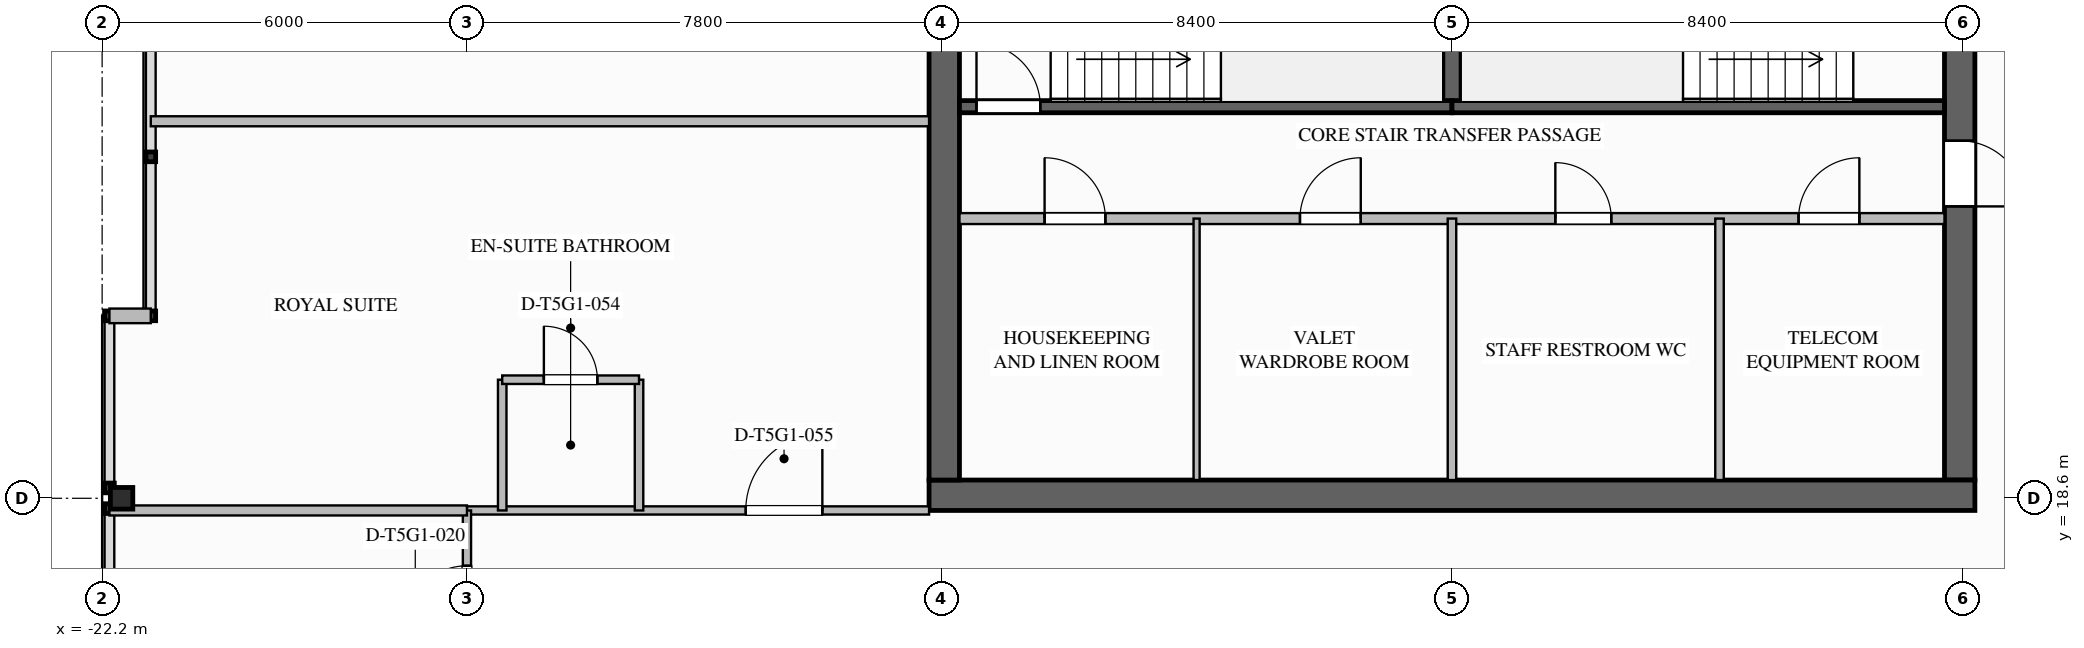
"""IFC4 building model, lengths in metres.
Left out: names, types, materials, properties, quantities, classifications, styles, units other than length and angle.
Written with IfcOpenShell. Run it as: python <this file> out.ifc"""

import sys

from ifc_helpers import new_model, si_unit, direction, frame, frame_2d, origin, origin_2d, place, context, subcontext, project, spatial, rectangle, i_section, extrude, element, fill, save


model = new_model("IFC4")
c1 = context("Model", 3, precision=1e-05, world=origin(), true_north=direction((0.0, 1.0)))
c2 = subcontext(c1, "Body", "Model", "MODEL_VIEW")
j1 = project(units=[si_unit("LENGTHUNIT", "METRE"), si_unit("PLANEANGLEUNIT", "RADIAN")], contexts=[c1])
p1 = place(None, origin())
s1 = spatial("IfcSite", under=j1, at=p1, CompositionType="ELEMENT")
p2 = place(p1, origin())
s2 = spatial("IfcBuilding", under=s1, at=p2, CompositionType="ELEMENT")
p3 = place(p2, frame((0.0, 0.0, 272.3)))
s3 = spatial("IfcBuildingStorey", under=s2, at=p3, CompositionType="ELEMENT", Elevation=272.3)
p4 = place(p3, frame((8.35, 35.1, 0.0), z_axis=(0.0, 0.0, 1.0), x_axis=(0.0, -1.0, 0.0)))
e1 = element("IfcWall", 1, at=p4, inside=s3, PredefinedType="SHEAR", context=c2, shape_type="SweptSolid", body=[
    extrude(rectangle(XDim=16.2, YDim=0.5, at=frame_2d((8.1, 0.0))), origin(), (0.0, 0.0, 1.0), 3.65),
])
p5 = place(p4, frame((3.08, 0.0, 0.0)))
e2 = element("IfcOpeningElement", 2, at=p5, cuts=e1, PredefinedType="OPENING", context=c2, shape_type="SweptSolid", body=[
    extrude(rectangle(XDim=1.12, YDim=2.1, at=frame_2d((0.56, 1.05))), frame((0.0, 0.26, 0.0), z_axis=(0.0, -1.0, 0.0), x_axis=(1.0, 0.0, 0.0)), (0.0, 0.0, 1.0), 0.52),
])
p6 = place(p4, frame((10.62, 0.0, 0.0)))
e3 = element("IfcOpeningElement", 3, at=p6, cuts=e1, PredefinedType="OPENING", context=c2, shape_type="SweptSolid", body=[
    extrude(rectangle(XDim=1.08, YDim=2.04, at=frame_2d((0.54, 1.02))), frame((0.0, 0.26, 0.0), z_axis=(0.0, -1.0, 0.0), x_axis=(1.0, 0.0, 0.0)), (0.0, 0.0, 1.0), 0.52),
])
p7 = place(p3, frame((8.6, 18.65, 0.0), z_axis=(0.0, 0.0, 1.0), x_axis=(-1.0, 0.0, 0.0)))
e4 = element("IfcWall", 4, at=p7, inside=s3, PredefinedType="SHEAR", context=c2, shape_type="SweptSolid", body=[
    extrude(rectangle(XDim=17.2, YDim=0.5, at=frame_2d((8.6, 0.0))), origin(), (0.0, 0.0, 1.0), 3.65),
])
p8 = place(p3, frame((-8.35, 18.9, 0.0), z_axis=(0.0, 0.0, 1.0), x_axis=(0.0, 1.0, 0.0)))
e5 = element("IfcWall", 5, at=p8, inside=s3, PredefinedType="SHEAR", context=c2, shape_type="SweptSolid", body=[
    extrude(rectangle(XDim=16.2, YDim=0.5, at=frame_2d((8.1, 0.0))), origin(), (0.0, 0.0, 1.0), 3.65),
])
p9 = place(p3, frame((-21.88, 18.6, 0.0), z_axis=(0.0, 0.0, 1.0), x_axis=(1.0, 0.0, 0.0)))
e6 = element("IfcColumn", 6, at=p9, inside=s3, PredefinedType="COLUMN", context=c2, shape_type="SweptSolid", body=[
    extrude(i_section(OverallWidth=0.369, OverallDepth=0.356, WebThickness=0.011, FlangeThickness=0.018, FilletRadius=0.025, at=origin_2d()), origin(), (0.0, 0.0, 1.0), 3.647),
])
p10 = place(p3, frame((-22.08, 21.6, 0.0), z_axis=(0.0, 0.0, 1.0), x_axis=(1.0, 0.0, 0.0)))
e7 = element("IfcWall", 7, at=p10, inside=s3, PredefinedType="STANDARD", context=c2, shape_type="SweptSolid", body=[
    extrude(rectangle(XDim=0.68, YDim=0.24, at=frame_2d((0.34, 0.0))), origin(), (0.0, 0.0, 1.0), 3.39),
])
p11 = place(p3, frame((0.0, 25.04, 0.0), z_axis=(0.0, 0.0, 1.0), x_axis=(0.0, 1.0, 0.0)))
e8 = element("IfcWall", 8, at=p11, inside=s3, PredefinedType="SOLIDWALL", context=c2, shape_type="SweptSolid", body=[
    extrude(rectangle(XDim=3.12, YDim=0.3, at=frame_2d((1.56, 0.0))), origin(), (0.0, 0.0, 1.0), 3.39),
])
p12 = place(p3, frame((-8.1, 25.04, 0.0), z_axis=(0.0, 0.0, 1.0), x_axis=(1.0, 0.0, 0.0)))
e9 = element("IfcWall", 9, at=p12, inside=s3, PredefinedType="SOLIDWALL", context=c2, shape_type="SweptSolid", body=[
    extrude(rectangle(XDim=8.1, YDim=0.2, at=frame_2d((4.05, 0.0))), origin(), (0.0, 0.0, 1.0), 3.39),
])
p13 = place(p12, frame((0.28, 0.0, 0.0)))
e10 = element("IfcOpeningElement", 10, at=p13, cuts=e9, PredefinedType="OPENING", context=c2, shape_type="SweptSolid", body=[
    extrude(rectangle(XDim=1.05, YDim=2.1, at=frame_2d((0.525, 1.05))), frame((0.0, 0.11, 0.0), z_axis=(0.0, -1.0, 0.0), x_axis=(1.0, 0.0, 0.0)), (0.0, 0.0, 1.0), 0.22),
])
p14 = place(p3, frame((0.0, 25.04, 0.0), z_axis=(0.0, 0.0, 1.0), x_axis=(1.0, 0.0, 0.0)))
e11 = element("IfcWall", 11, at=p14, inside=s3, PredefinedType="SOLIDWALL", context=c2, shape_type="SweptSolid", body=[
    extrude(rectangle(XDim=8.1, YDim=0.2, at=frame_2d((4.05, 0.0))), origin(), (0.0, 0.0, 1.0), 3.39),
])
p15 = place(p3, frame((-8.1, 23.2, 0.0), z_axis=(0.0, 0.0, 1.0), x_axis=(1.0, 0.0, 0.0)))
e12 = element("IfcWall", 12, at=p15, inside=s3, PredefinedType="SOLIDWALL", context=c2, shape_type="SweptSolid", body=[
    extrude(rectangle(XDim=16.2, YDim=0.18, at=frame_2d((8.1, 0.0))), origin(), (0.0, 0.0, 1.0), 3.39),
])
p16 = place(p15, frame((1.4, 0.0, 0.0)))
e13 = element("IfcOpeningElement", 13, at=p16, cuts=e12, PredefinedType="OPENING", context=c2, shape_type="SweptSolid", body=[
    extrude(rectangle(XDim=1.0, YDim=2.1, at=frame_2d((0.5, 1.05))), frame((0.0, 0.1, 0.0), z_axis=(0.0, -1.0, 0.0), x_axis=(1.0, 0.0, 0.0)), (0.0, 0.0, 1.0), 0.2),
])
p17 = place(p15, frame((5.6, 0.0, 0.0)))
e14 = element("IfcOpeningElement", 14, at=p17, cuts=e12, PredefinedType="OPENING", context=c2, shape_type="SweptSolid", body=[
    extrude(rectangle(XDim=1.0, YDim=2.1, at=frame_2d((0.5, 1.05))), frame((0.0, 0.1, 0.0), z_axis=(0.0, -1.0, 0.0), x_axis=(1.0, 0.0, 0.0)), (0.0, 0.0, 1.0), 0.2),
])
p18 = place(p15, frame((9.8, 0.0, 0.0)))
e15 = element("IfcOpeningElement", 15, at=p18, cuts=e12, PredefinedType="OPENING", context=c2, shape_type="SweptSolid", body=[
    extrude(rectangle(XDim=0.92, YDim=2.1, at=frame_2d((0.46, 1.05))), frame((0.0, 0.1, 0.0), z_axis=(0.0, -1.0, 0.0), x_axis=(1.0, 0.0, 0.0)), (0.0, 0.0, 1.0), 0.2),
])
p19 = place(p15, frame((13.8, 0.0, 0.0)))
e16 = element("IfcOpeningElement", 16, at=p19, cuts=e12, PredefinedType="OPENING", context=c2, shape_type="SweptSolid", body=[
    extrude(rectangle(XDim=1.0, YDim=2.1, at=frame_2d((0.5, 1.05))), frame((0.0, 0.1, 0.0), z_axis=(0.0, -1.0, 0.0), x_axis=(1.0, 0.0, 0.0)), (0.0, 0.0, 1.0), 0.2),
])
p20 = place(p3, frame((-4.2, 18.9, 0.0), z_axis=(0.0, 0.0, 1.0), x_axis=(0.0, 1.0, 0.0)))
e17 = element("IfcWall", 17, at=p20, inside=s3, PredefinedType="PARTITIONING", context=c2, shape_type="SweptSolid", body=[
    extrude(rectangle(XDim=4.3, YDim=0.1, at=frame_2d((2.15, 0.0))), origin(), (0.0, 0.0, 1.0), 3.39),
])
for number, where, z_axis, x_axis in (
    (18, (0.0, 18.9, 0.0), (0.0, 0.0, 1.0), (0.0, 1.0, 0.0)),
    (19, (4.4, 18.9, 0.0), (0.0, 0.0, 1.0), (0.0, 1.0, 0.0)),
):
    element("IfcWall", number, at=place(p3, frame(where, z_axis=z_axis, x_axis=x_axis)), inside=s3, PredefinedType="PLUMBINGWALL", context=c2, shape_type="SweptSolid", body=[
        extrude(rectangle(XDim=4.3, YDim=0.14, at=frame_2d((2.15, 0.0))), origin(), (0.0, 0.0, 1.0), 3.39),
    ])
p21 = place(p3, frame((-16.2, 18.4, 0.0), z_axis=(0.0, 0.0, 1.0), x_axis=(1.0, 0.0, 0.0)))
e20 = element("IfcWall", 20, at=p21, inside=s3, PredefinedType="PARTITIONING", context=c2, shape_type="SweptSolid", body=[
    extrude(rectangle(XDim=7.6, YDim=0.135, at=frame_2d((3.8, 0.0))), origin(), (0.0, 0.0, 1.0), 2.767),
])
p22 = place(p21, frame((4.585, 0.0, 0.0)))
e21 = element("IfcOpeningElement", 21, at=p22, cuts=e20, PredefinedType="OPENING", context=c2, shape_type="SweptSolid", body=[
    extrude(rectangle(XDim=1.26, YDim=2.2, at=frame_2d((0.63, 1.1))), frame((0.0, 0.077, 0.0), z_axis=(0.0, -1.0, 0.0), x_axis=(1.0, 0.0, 0.0)), (0.0, 0.0, 1.0), 0.155),
])
p23 = place(p3, frame((-16.2, 15.95, 0.0), z_axis=(0.0, 0.0, 1.0), x_axis=(0.0, 1.0, 0.0)))
e22 = element("IfcWall", 22, at=p23, inside=s3, PredefinedType="PARTITIONING", context=c2, shape_type="SweptSolid", body=[
    extrude(rectangle(XDim=2.45, YDim=0.135, at=frame_2d((1.225, 0.0))), origin(), (0.0, 0.0, 1.0), 2.764),
])
p24 = place(p23, frame((0.52, 0.0, 0.0)))
e23 = element("IfcOpeningElement", 23, at=p24, cuts=e22, PredefinedType="OPENING", context=c2, shape_type="SweptSolid", body=[
    extrude(rectangle(XDim=1.02, YDim=2.15, at=frame_2d((0.51, 1.075))), frame((0.0, 0.077, 0.0), z_axis=(0.0, -1.0, 0.0), x_axis=(1.0, 0.0, 0.0)), (0.0, 0.0, 1.0), 0.155),
])
p25 = place(p3, frame((-22.08, 18.4, 0.0), z_axis=(0.0, 0.0, 1.0), x_axis=(1.0, 0.0, 0.0)))
e24 = element("IfcWall", 24, at=p25, inside=s3, PredefinedType="PARTITIONING", context=c2, shape_type="SweptSolid", body=[
    extrude(rectangle(XDim=5.88, YDim=0.165, at=frame_2d((2.94, 0.0))), origin(), (0.0, 0.0, 1.0), 2.764),
])
p26 = place(p3, frame((-21.4, 24.8, 0.0), z_axis=(0.0, 0.0, 1.0), x_axis=(1.0, 0.0, 0.0)))
e25 = element("IfcWall", 25, at=p26, inside=s3, PredefinedType="PARTITIONING", context=c2, shape_type="SweptSolid", body=[
    extrude(rectangle(XDim=12.8, YDim=0.165, at=frame_2d((6.4, 0.0))), origin(), (0.0, 0.0, 1.0), 3.39),
])
for number, where, z_axis, x_axis in (
    (26, (-15.62, 18.4, 0.0), (0.0, 0.0, 1.0), (0.0, 1.0, 0.0)),
    (27, (-13.37, 18.4, 0.0), (0.0, 0.0, 1.0), (0.0, 1.0, 0.0)),
):
    element("IfcWall", number, at=place(p3, frame(where, z_axis=z_axis, x_axis=x_axis)), inside=s3, PredefinedType="PLUMBINGWALL", context=c2, shape_type="SweptSolid", body=[
        extrude(rectangle(XDim=2.15, YDim=0.14, at=frame_2d((1.075, 0.0))), origin(), (0.0, 0.0, 1.0), 3.39),
    ])
p27 = place(p3, frame((-15.62, 20.55, 0.0), z_axis=(0.0, 0.0, 1.0), x_axis=(1.0, 0.0, 0.0)))
e28 = element("IfcWall", 28, at=p27, inside=s3, PredefinedType="PLUMBINGWALL", context=c2, shape_type="SweptSolid", body=[
    extrude(rectangle(XDim=2.25, YDim=0.14, at=frame_2d((1.125, 0.0))), origin(), (0.0, 0.0, 1.0), 3.39),
])
p28 = place(p27, frame((0.685, 0.0, 0.0)))
e29 = element("IfcOpeningElement", 29, at=p28, cuts=e28, PredefinedType="OPENING", context=c2, shape_type="SweptSolid", body=[
    extrude(rectangle(XDim=0.88, YDim=2.1, at=frame_2d((0.44, 1.05))), frame((0.0, 0.08, 0.0), z_axis=(0.0, -1.0, 0.0), x_axis=(1.0, 0.0, 0.0)), (0.0, 0.0, 1.0), 0.16),
])
p29 = place(p13, origin())
e30 = element("IfcDoor", 30, at=p29, inside=s3, OperationType="SINGLE_SWING_LEFT", PredefinedType="DOOR", context=c2, shape_type="SweptSolid", body=[
    extrude(rectangle(XDim=1.05, YDim=2.1, at=frame_2d((0.525, 1.05))), frame((0.0, 0.025, 0.0), z_axis=(0.0, -1.0, 0.0), x_axis=(1.0, 0.0, 0.0)), (0.0, 0.0, 1.0), 0.05),
])
fill(e10, e30)
p30 = place(p6, origin())
e31 = element("IfcDoor", 31, at=p30, inside=s3, OperationType="SINGLE_SWING_RIGHT", PredefinedType="DOOR", context=c2, shape_type="SweptSolid", body=[
    extrude(rectangle(XDim=1.08, YDim=2.04, at=frame_2d((0.54, 1.02))), frame((0.0, 0.025, 0.0), z_axis=(0.0, -1.0, 0.0), x_axis=(1.0, 0.0, 0.0)), (0.0, 0.0, 1.0), 0.05),
])
fill(e3, e31)
p31 = place(p16, origin())
e32 = element("IfcDoor", 32, at=p31, inside=s3, OperationType="SINGLE_SWING_LEFT", PredefinedType="DOOR", context=c2, shape_type="SweptSolid", body=[
    extrude(rectangle(XDim=1.0, YDim=2.1, at=frame_2d((0.5, 1.05))), frame((0.0, 0.025, 0.0), z_axis=(0.0, -1.0, 0.0), x_axis=(1.0, 0.0, 0.0)), (0.0, 0.0, 1.0), 0.05),
])
fill(e13, e32)
p32 = place(p17, origin())
e33 = element("IfcDoor", 33, at=p32, inside=s3, OperationType="SINGLE_SWING_RIGHT", PredefinedType="DOOR", context=c2, shape_type="SweptSolid", body=[
    extrude(rectangle(XDim=1.0, YDim=2.1, at=frame_2d((0.5, 1.05))), frame((0.0, 0.025, 0.0), z_axis=(0.0, -1.0, 0.0), x_axis=(1.0, 0.0, 0.0)), (0.0, 0.0, 1.0), 0.05),
])
fill(e14, e33)
p33 = place(p18, origin())
e34 = element("IfcDoor", 34, at=p33, inside=s3, OperationType="SINGLE_SWING_LEFT", PredefinedType="DOOR", context=c2, shape_type="SweptSolid", body=[
    extrude(rectangle(XDim=0.92, YDim=2.1, at=frame_2d((0.46, 1.05))), frame((0.0, 0.025, 0.0), z_axis=(0.0, -1.0, 0.0), x_axis=(1.0, 0.0, 0.0)), (0.0, 0.0, 1.0), 0.05),
])
fill(e15, e34)
p34 = place(p19, origin())
e35 = element("IfcDoor", 35, at=p34, inside=s3, OperationType="SINGLE_SWING_RIGHT", PredefinedType="DOOR", context=c2, shape_type="SweptSolid", body=[
    extrude(rectangle(XDim=1.0, YDim=2.1, at=frame_2d((0.5, 1.05))), frame((0.0, 0.025, 0.0), z_axis=(0.0, -1.0, 0.0), x_axis=(1.0, 0.0, 0.0)), (0.0, 0.0, 1.0), 0.05),
])
fill(e16, e35)
p35 = place(p24, origin())
e36 = element("IfcDoor", 36, at=p35, inside=s3, OperationType="SINGLE_SWING_LEFT", PredefinedType="DOOR", context=c2, shape_type="SweptSolid", body=[
    extrude(rectangle(XDim=1.02, YDim=2.15, at=frame_2d((0.51, 1.075))), frame((0.0, 0.025, 0.0), z_axis=(0.0, -1.0, 0.0), x_axis=(1.0, 0.0, 0.0)), (0.0, 0.0, 1.0), 0.05),
])
fill(e23, e36)
p36 = place(p28, origin())
e37 = element("IfcDoor", 37, at=p36, inside=s3, OperationType="SINGLE_SWING_LEFT", PredefinedType="DOOR", context=c2, shape_type="SweptSolid", body=[
    extrude(rectangle(XDim=0.88, YDim=2.1, at=frame_2d((0.44, 1.05))), frame((0.0, 0.025, 0.0), z_axis=(0.0, -1.0, 0.0), x_axis=(1.0, 0.0, 0.0)), (0.0, 0.0, 1.0), 0.05),
])
fill(e29, e37)
p37 = place(p22, origin())
e38 = element("IfcDoor", 38, at=p37, inside=s3, OperationType="SINGLE_SWING_RIGHT", PredefinedType="DOOR", context=c2, shape_type="SweptSolid", body=[
    extrude(rectangle(XDim=1.26, YDim=2.2, at=frame_2d((0.63, 1.1))), frame((0.0, 0.025, 0.0), z_axis=(0.0, -1.0, 0.0), x_axis=(1.0, 0.0, 0.0)), (0.0, 0.0, 1.0), 0.05),
])
fill(e21, e38)
save(model, sys.argv[1])
